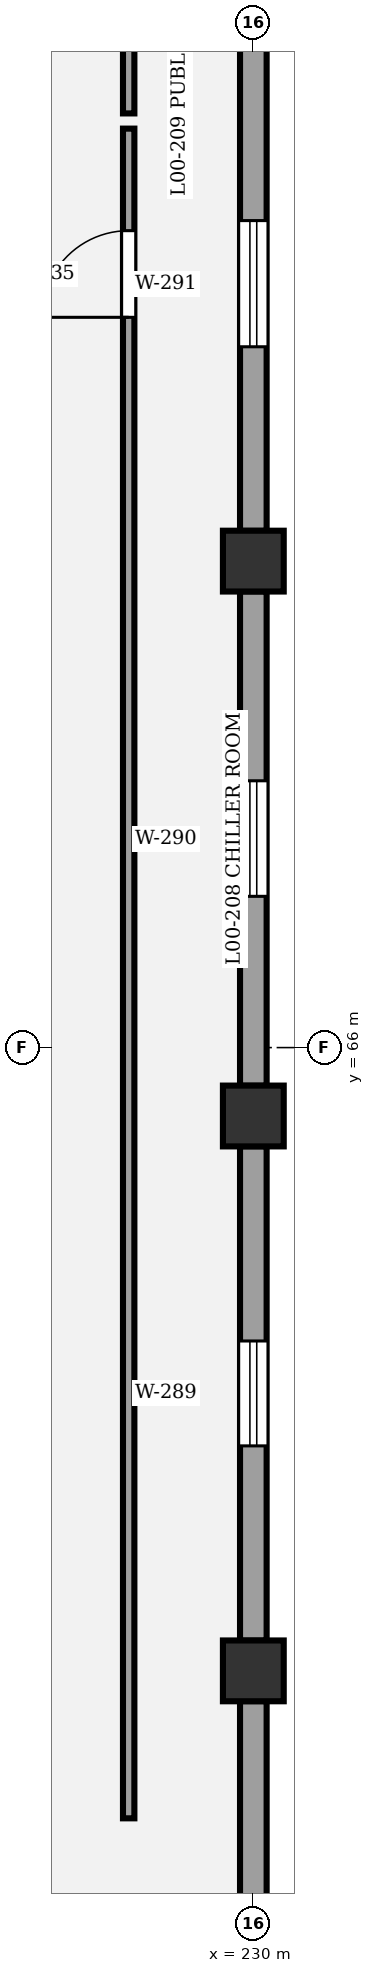
"""IFC4 building model, lengths in metres.
Left out: names, types, materials, properties, quantities, classifications, styles, units other than length and angle.
Written with IfcOpenShell. Run it as: python <this file> out.ifc"""

import sys

from ifc_helpers import new_model, si_unit, direction, frame, frame_2d, origin, origin_2d, place, context, subcontext, project, spatial, rectangle, circle, extrude, element, fill, save


model = new_model("IFC4")
c1 = context("Model", 3, precision=1e-05, world=origin(), true_north=direction((0.0, 1.0)))
c2 = subcontext(c1, "Body", "Model", "MODEL_VIEW")
j1 = project(units=[si_unit("LENGTHUNIT", "METRE"), si_unit("PLANEANGLEUNIT", "RADIAN")], contexts=[c1])
p1 = place(None, origin())
s1 = spatial("IfcSite", under=j1, at=p1, CompositionType="ELEMENT")
p2 = place(p1, origin())
s2 = spatial("IfcBuilding", under=s1, at=p2, CompositionType="ELEMENT")
p3 = place(p2, origin())
s3 = spatial("IfcBuildingStorey", under=s2, at=p3, CompositionType="ELEMENT", Elevation=0.0)
for number, where, z_axis, x_axis in (
    (1, (230.0, 57.8, 0.0), (0.0, 0.0, 1.0), (1.0, 0.0, 0.0)),
    (2, (230.0, 65.1, 0.0), (0.0, 0.0, 1.0), (1.0, 0.0, 0.0)),
    (3, (230.0, 72.4, 0.0), (0.0, 0.0, 1.0), (1.0, 0.0, 0.0)),
):
    element("IfcColumn", number, at=place(p3, frame(where, z_axis=z_axis, x_axis=x_axis)), inside=s3, PredefinedType="COLUMN", context=c2, shape_type="SweptSolid", body=[
        extrude(circle(Radius=0.4, at=origin_2d()), origin(), (0.0, 0.0, 1.0), 5.4),
    ])
p4 = place(p3, frame((230.0, 57.402, 0.0), z_axis=(0.0, 0.0, 1.0), x_axis=(0.0, -1.0, 0.0)))
e4 = element("IfcWall", 4, at=p4, inside=s3, PredefinedType="STANDARD", context=c2, shape_type="SweptSolid", body=[
    extrude(rectangle(XDim=6.504, YDim=0.35, at=frame_2d((3.252, 0.0))), origin(), (0.0, 0.0, 1.0), 4.16),
])
p5 = place(p4, frame((2.632, 0.0, 0.9)))
e5 = element("IfcOpeningElement", 5, at=p5, cuts=e4, PredefinedType="OPENING", context=c2, shape_type="SweptSolid", body=[
    extrude(rectangle(XDim=1.24, YDim=1.95, at=frame_2d((0.62, 0.975))), frame((0.0, 0.185, 0.0), z_axis=(0.0, -1.0, 0.0), x_axis=(1.0, 0.0, 0.0)), (0.0, 0.0, 1.0), 0.37),
])
p6 = place(p3, frame((230.0, 64.702, 0.0), z_axis=(0.0, 0.0, 1.0), x_axis=(0.0, -1.0, 0.0)))
e6 = element("IfcWall", 6, at=p6, inside=s3, PredefinedType="STANDARD", context=c2, shape_type="SweptSolid", body=[
    extrude(rectangle(XDim=6.504, YDim=0.35, at=frame_2d((3.252, 0.0))), origin(), (0.0, 0.0, 1.0), 4.16),
])
p7 = place(p6, frame((2.562, 0.0, 0.9)))
e7 = element("IfcOpeningElement", 7, at=p7, cuts=e6, PredefinedType="OPENING", context=c2, shape_type="SweptSolid", body=[
    extrude(rectangle(XDim=1.38, YDim=1.95, at=frame_2d((0.69, 0.975))), frame((0.0, 0.185, 0.0), z_axis=(0.0, -1.0, 0.0), x_axis=(1.0, 0.0, 0.0)), (0.0, 0.0, 1.0), 0.37),
])
p8 = place(p3, frame((230.0, 72.002, 0.0), z_axis=(0.0, 0.0, 1.0), x_axis=(0.0, -1.0, 0.0)))
e8 = element("IfcWall", 8, at=p8, inside=s3, PredefinedType="STANDARD", context=c2, shape_type="SweptSolid", body=[
    extrude(rectangle(XDim=6.504, YDim=0.35, at=frame_2d((3.252, 0.0))), origin(), (0.0, 0.0, 1.0), 4.16),
])
p9 = place(p8, frame((2.492, 0.0, 0.9)))
e9 = element("IfcOpeningElement", 9, at=p9, cuts=e8, PredefinedType="OPENING", context=c2, shape_type="SweptSolid", body=[
    extrude(rectangle(XDim=1.52, YDim=1.95, at=frame_2d((0.76, 0.975))), frame((0.0, 0.185, 0.0), z_axis=(0.0, -1.0, 0.0), x_axis=(1.0, 0.0, 0.0)), (0.0, 0.0, 1.0), 0.37),
])
p10 = place(p3, frame((230.0, 79.302, 0.0), z_axis=(0.0, 0.0, 1.0), x_axis=(0.0, -1.0, 0.0)))
e10 = element("IfcWall", 10, at=p10, inside=s3, PredefinedType="STANDARD", context=c2, shape_type="SweptSolid", body=[
    extrude(rectangle(XDim=6.504, YDim=0.35, at=frame_2d((3.252, 0.0))), origin(), (0.0, 0.0, 1.0), 4.16),
])
p11 = place(p10, frame((2.422, 0.0, 0.9)))
e11 = element("IfcOpeningElement", 11, at=p11, cuts=e10, PredefinedType="OPENING", context=c2, shape_type="SweptSolid", body=[
    extrude(rectangle(XDim=1.66, YDim=1.95, at=frame_2d((0.83, 0.975))), frame((0.0, 0.185, 0.0), z_axis=(0.0, -1.0, 0.0), x_axis=(1.0, 0.0, 0.0)), (0.0, 0.0, 1.0), 0.37),
])
p12 = place(p3, frame((228.36, 55.86, 0.0), z_axis=(0.0, 0.0, 1.0), x_axis=(0.0, 1.0, 0.0)))
e12 = element("IfcWall", 12, at=p12, inside=s3, PredefinedType="PARTITIONING", context=c2, shape_type="SweptSolid", body=[
    extrude(rectangle(XDim=22.23, YDim=0.15, at=frame_2d((11.115, 0.0))), origin(), (0.0, 0.0, 1.0), 4.15),
])
p13 = place(p12, frame((19.748, 0.0, 0.0)))
e13 = element("IfcOpeningElement", 13, at=p13, cuts=e12, PredefinedType="OPENING", context=c2, shape_type="SweptSolid", body=[
    extrude(rectangle(XDim=1.14, YDim=2.3, at=frame_2d((0.57, 1.15))), frame((0.0, 0.085, 0.0), z_axis=(0.0, -1.0, 0.0), x_axis=(1.0, 0.0, 0.0)), (0.0, 0.0, 1.0), 0.17),
])
p14 = place(p3, frame((228.36, 78.29, 0.0), z_axis=(0.0, 0.0, 1.0), x_axis=(0.0, 1.0, 0.0)))
e14 = element("IfcWall", 14, at=p14, inside=s3, PredefinedType="PARTITIONING", context=c2, shape_type="SweptSolid", body=[
    extrude(rectangle(XDim=22.23, YDim=0.15, at=frame_2d((11.115, 0.0))), origin(), (0.0, 0.0, 1.0), 4.15),
])
p15 = place(p14, frame((4.402, 0.0, 0.0)))
e15 = element("IfcOpeningElement", 15, at=p15, cuts=e14, PredefinedType="OPENING", context=c2, shape_type="SweptSolid", body=[
    extrude(rectangle(XDim=1.18, YDim=2.3, at=frame_2d((0.59, 1.15))), frame((0.0, 0.085, 0.0), z_axis=(0.0, -1.0, 0.0), x_axis=(1.0, 0.0, 0.0)), (0.0, 0.0, 1.0), 0.17),
])
p16 = place(p7, origin())
e16 = element("IfcWindow", 16, at=p16, inside=s3, PartitioningType="SINGLE_PANEL", PredefinedType="WINDOW", context=c2, shape_type="SweptSolid", body=[
    extrude(rectangle(XDim=1.38, YDim=1.95, at=frame_2d((0.69, 0.975))), frame((0.0, 0.03, 0.0), z_axis=(0.0, -1.0, 0.0), x_axis=(1.0, 0.0, 0.0)), (0.0, 0.0, 1.0), 0.06),
])
fill(e7, e16)
p17 = place(p9, origin())
e17 = element("IfcWindow", 17, at=p17, inside=s3, PartitioningType="SINGLE_PANEL", PredefinedType="WINDOW", context=c2, shape_type="SweptSolid", body=[
    extrude(rectangle(XDim=1.52, YDim=1.95, at=frame_2d((0.76, 0.975))), frame((0.0, 0.03, 0.0), z_axis=(0.0, -1.0, 0.0), x_axis=(1.0, 0.0, 0.0)), (0.0, 0.0, 1.0), 0.06),
])
fill(e9, e17)
p18 = place(p11, origin())
e18 = element("IfcWindow", 18, at=p18, inside=s3, PartitioningType="SINGLE_PANEL", PredefinedType="WINDOW", context=c2, shape_type="SweptSolid", body=[
    extrude(rectangle(XDim=1.66, YDim=1.95, at=frame_2d((0.83, 0.975))), frame((0.0, 0.03, 0.0), z_axis=(0.0, -1.0, 0.0), x_axis=(1.0, 0.0, 0.0)), (0.0, 0.0, 1.0), 0.06),
])
fill(e11, e18)
p19 = place(p13, origin())
e19 = element("IfcDoor", 19, at=p19, inside=s3, OperationType="SINGLE_SWING_LEFT", PredefinedType="DOOR", context=c2, shape_type="SweptSolid", body=[
    extrude(rectangle(XDim=1.14, YDim=2.3, at=frame_2d((0.57, 1.15))), frame((0.0, 0.025, 0.0), z_axis=(0.0, -1.0, 0.0), x_axis=(1.0, 0.0, 0.0)), (0.0, 0.0, 1.0), 0.05),
])
fill(e13, e19)
save(model, sys.argv[1])
